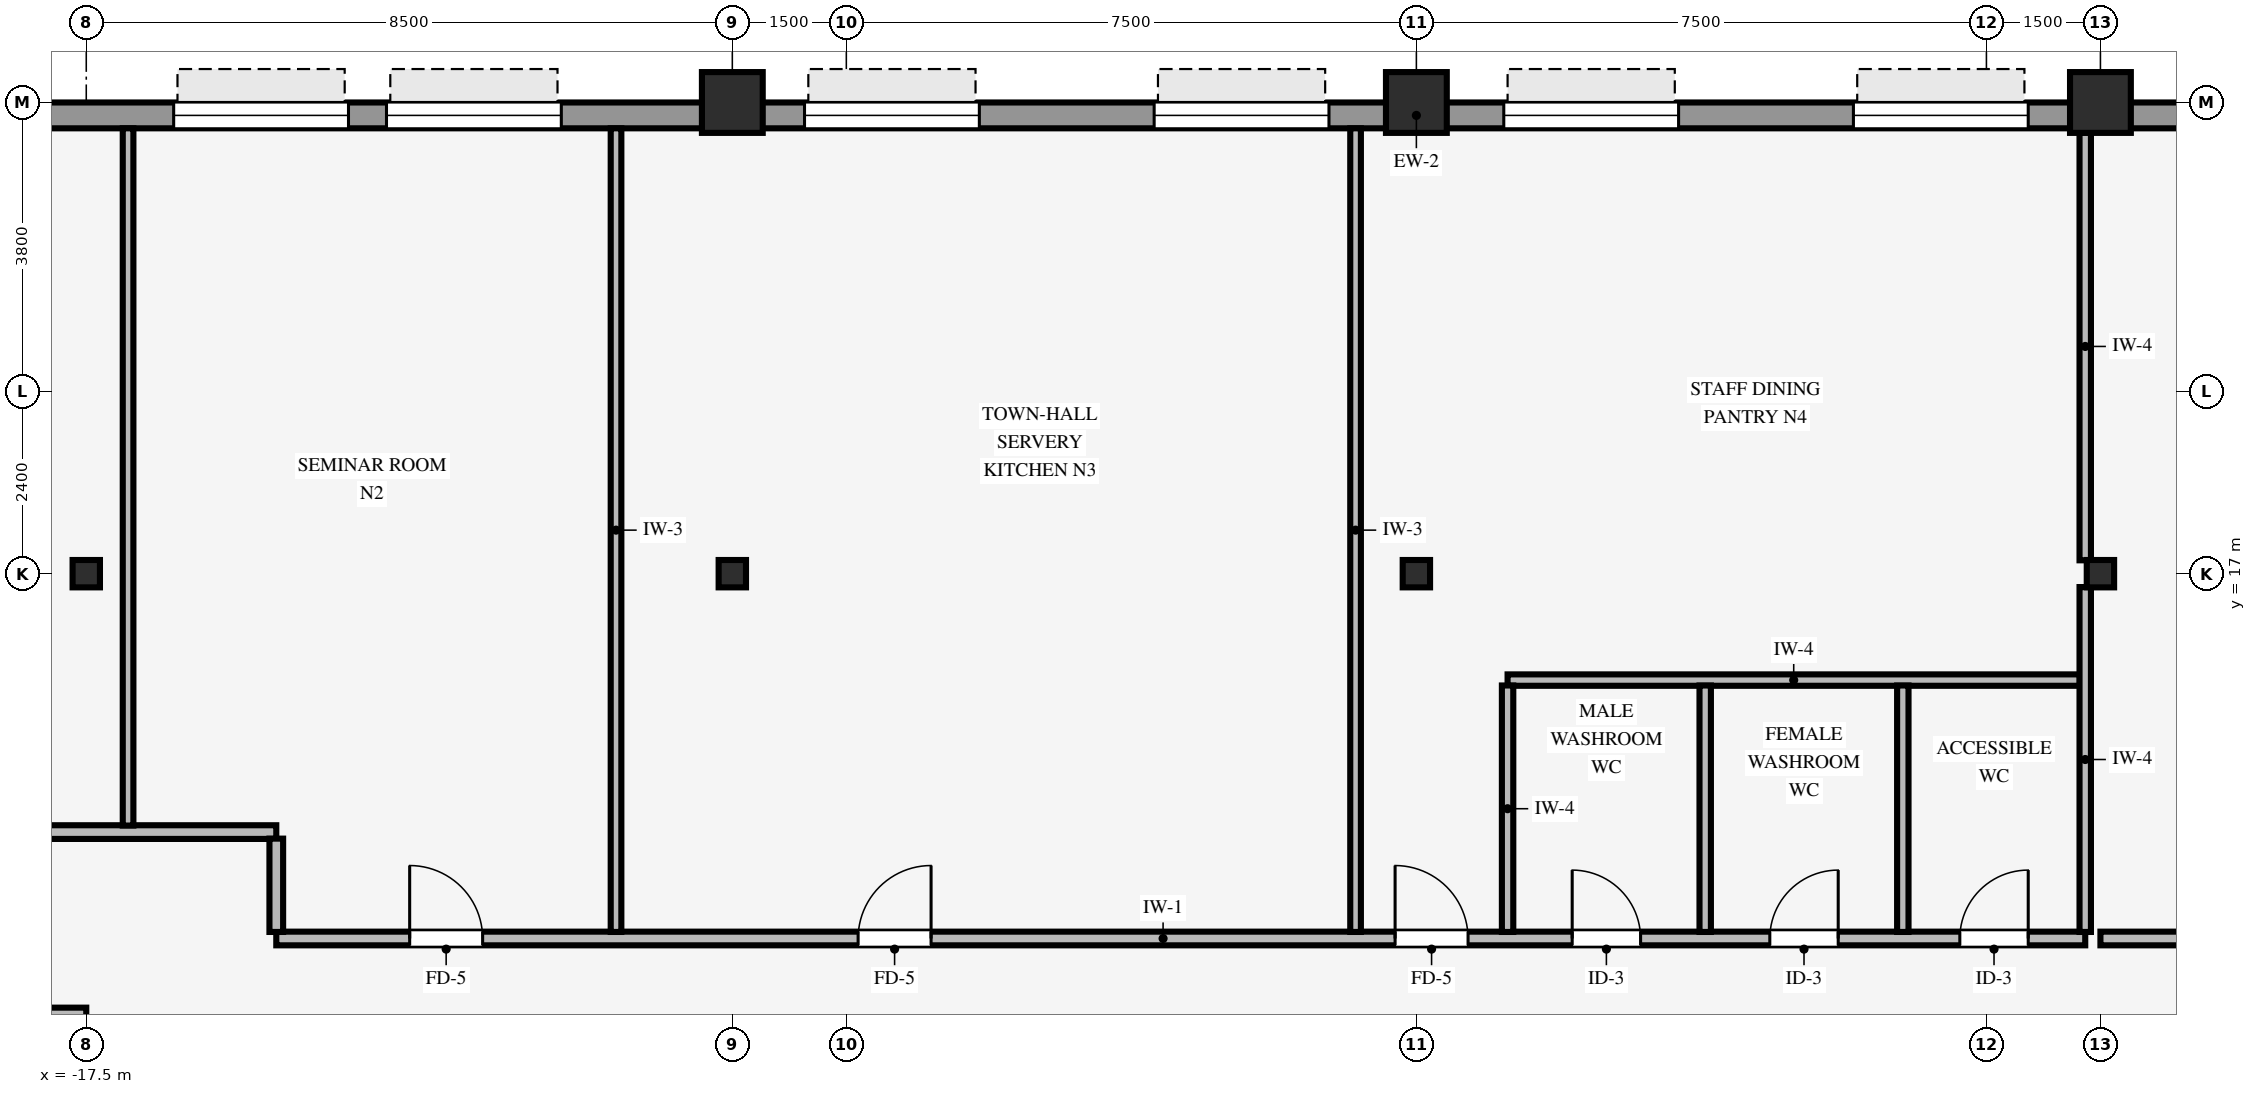
"""IFC4 building model, lengths in metres.
Left out: names, types, materials, properties, quantities, classifications, styles, units other than length and angle.
Written with IfcOpenShell. Run it as: python <this file> out.ifc"""

import sys

from ifc_helpers import new_model, si_unit, direction, frame, frame_2d, origin, origin_2d, place, context, subcontext, project, spatial, rectangle, hollow_rectangle, i_section, extrude, source, transform, mapped, element, fill, save


model = new_model("IFC4")
c1 = context("Model", 3, precision=1e-05, world=origin(), true_north=direction((0.0, 1.0)))
c2 = subcontext(c1, "Body", "Model", "MODEL_VIEW")
j1 = project(units=[si_unit("LENGTHUNIT", "METRE"), si_unit("PLANEANGLEUNIT", "RADIAN")], contexts=[c1])
p1 = place(None, origin())
s1 = spatial("IfcSite", under=j1, at=p1, CompositionType="ELEMENT")
p2 = place(p1, origin())
s2 = spatial("IfcBuilding", under=s1, at=p2, CompositionType="ELEMENT")
p3 = place(p2, frame((0.0, 0.0, 56.8)))
s3 = spatial("IfcBuildingStorey", under=s2, at=p3, CompositionType="ELEMENT", Elevation=56.8)
for number, where, z_axis, x_axis in (
    (1, (-9.0, 23.2, 0.0), (0.0, 0.0, 1.0), (1.0, 0.0, 0.0)),
    (2, (0.0, 23.2, 0.0), (0.0, 0.0, 1.0), (1.0, 0.0, 0.0)),
    (3, (9.0, 23.2, 0.0), (0.0, 0.0, 1.0), (1.0, 0.0, 0.0)),
):
    element("IfcColumn", number, at=place(p3, frame(where, z_axis=z_axis, x_axis=x_axis)), inside=s3, PredefinedType="COLUMN", context=c2, shape_type="SweptSolid", body=[
        extrude(hollow_rectangle(XDim=0.8, YDim=0.8, WallThickness=0.055, InnerFilletRadius=0.055, OuterFilletRadius=0.11, at=origin_2d()), origin(), (0.0, 0.0, 1.0), 3.37),
    ])
for number, where, z_axis, x_axis in (
    (4, (0.0, 17.0, 0.0), (0.0, 0.0, 1.0), (1.0, 0.0, 0.0)),
    (5, (-17.5, 17.0, 0.0), (0.0, 0.0, 1.0), (1.0, 0.0, 0.0)),
    (6, (-9.0, 17.0, 0.0), (0.0, 0.0, 1.0), (1.0, 0.0, 0.0)),
    (7, (9.0, 17.0, 0.0), (0.0, 0.0, 1.0), (1.0, 0.0, 0.0)),
):
    element("IfcColumn", number, at=place(p3, frame(where, z_axis=z_axis, x_axis=x_axis)), inside=s3, PredefinedType="COLUMN", context=c2, shape_type="SweptSolid", body=[
        extrude(i_section(OverallWidth=0.36, OverallDepth=0.36, WebThickness=0.021, FlangeThickness=0.021, FilletRadius=0.018, at=origin_2d()), origin(), (0.0, 0.0, 1.0), 3.37),
    ])
p4 = place(p3, frame((-19.4, 23.03, 0.0), z_axis=(0.0, 0.0, 1.0), x_axis=(1.0, 0.0, 0.0)))
e8 = element("IfcWall", 8, at=p4, inside=s3, PredefinedType="STANDARD", context=c2, shape_type="SweptSolid", body=[
    extrude(rectangle(XDim=38.8, YDim=0.34, at=frame_2d((19.4, 0.0))), origin(), (0.0, 0.0, 1.0), 2.705),
])
p5 = place(p4, frame((3.05, 0.0, 0.8)))
e9 = element("IfcOpeningElement", 9, at=p5, cuts=e8, PredefinedType="OPENING", context=c2, shape_type="SweptSolid", body=[
    extrude(rectangle(XDim=2.3, YDim=1.62, at=frame_2d((1.15, 0.81))), frame((0.0, 0.18, 0.0), z_axis=(0.0, -1.0, 0.0), x_axis=(1.0, 0.0, 0.0)), (0.0, 0.0, 1.0), 0.36),
])
p6 = place(p4, frame((5.85, 0.0, 0.8)))
e10 = element("IfcOpeningElement", 10, at=p6, cuts=e8, PredefinedType="OPENING", context=c2, shape_type="SweptSolid", body=[
    extrude(rectangle(XDim=2.3, YDim=1.62, at=frame_2d((1.15, 0.81))), frame((0.0, 0.18, 0.0), z_axis=(0.0, -1.0, 0.0), x_axis=(1.0, 0.0, 0.0)), (0.0, 0.0, 1.0), 0.36),
])
p7 = place(p4, frame((11.35, 0.0, 0.8)))
e11 = element("IfcOpeningElement", 11, at=p7, cuts=e8, PredefinedType="OPENING", context=c2, shape_type="SweptSolid", body=[
    extrude(rectangle(XDim=2.3, YDim=1.62, at=frame_2d((1.15, 0.81))), frame((0.0, 0.18, 0.0), z_axis=(0.0, -1.0, 0.0), x_axis=(1.0, 0.0, 0.0)), (0.0, 0.0, 1.0), 0.36),
])
p8 = place(p4, frame((15.95, 0.0, 0.8)))
e12 = element("IfcOpeningElement", 12, at=p8, cuts=e8, PredefinedType="OPENING", context=c2, shape_type="SweptSolid", body=[
    extrude(rectangle(XDim=2.3, YDim=1.62, at=frame_2d((1.15, 0.81))), frame((0.0, 0.18, 0.0), z_axis=(0.0, -1.0, 0.0), x_axis=(1.0, 0.0, 0.0)), (0.0, 0.0, 1.0), 0.36),
])
p9 = place(p4, frame((20.55, 0.0, 0.8)))
e13 = element("IfcOpeningElement", 13, at=p9, cuts=e8, PredefinedType="OPENING", context=c2, shape_type="SweptSolid", body=[
    extrude(rectangle(XDim=2.3, YDim=1.62, at=frame_2d((1.15, 0.81))), frame((0.0, 0.18, 0.0), z_axis=(0.0, -1.0, 0.0), x_axis=(1.0, 0.0, 0.0)), (0.0, 0.0, 1.0), 0.36),
])
p10 = place(p4, frame((25.15, 0.0, 0.8)))
e14 = element("IfcOpeningElement", 14, at=p10, cuts=e8, PredefinedType="OPENING", context=c2, shape_type="SweptSolid", body=[
    extrude(rectangle(XDim=2.3, YDim=1.62, at=frame_2d((1.15, 0.81))), frame((0.0, 0.18, 0.0), z_axis=(0.0, -1.0, 0.0), x_axis=(1.0, 0.0, 0.0)), (0.0, 0.0, 1.0), 0.36),
])
p11 = place(p4, frame((29.75, 0.0, 0.8)))
e15 = element("IfcOpeningElement", 15, at=p11, cuts=e8, PredefinedType="OPENING", context=c2, shape_type="SweptSolid", body=[
    extrude(rectangle(XDim=2.3, YDim=1.62, at=frame_2d((1.15, 0.81))), frame((0.0, 0.18, 0.0), z_axis=(0.0, -1.0, 0.0), x_axis=(1.0, 0.0, 0.0)), (0.0, 0.0, 1.0), 0.36),
])
p12 = place(p4, frame((34.35, 0.0, 0.8)))
e16 = element("IfcOpeningElement", 16, at=p12, cuts=e8, PredefinedType="OPENING", context=c2, shape_type="SweptSolid", body=[
    extrude(rectangle(XDim=2.3, YDim=1.62, at=frame_2d((1.15, 0.81))), frame((0.0, 0.18, 0.0), z_axis=(0.0, -1.0, 0.0), x_axis=(1.0, 0.0, 0.0)), (0.0, 0.0, 1.0), 0.36),
])
p13 = place(p3, frame((-21.16, 11.2, 0.0), z_axis=(0.0, 0.0, 1.0), x_axis=(1.0, 0.0, 0.0)))
e17 = element("IfcWall", 17, at=p13, inside=s3, PredefinedType="PARTITIONING", context=c2, shape_type="SweptSolid", body=[
    extrude(rectangle(XDim=3.66, YDim=0.18, at=frame_2d((1.83, 0.0))), origin(), (0.0, 0.0, 1.0), 3.36),
])
p14 = place(p13, frame((1.68, 0.0, 0.0)))
e18 = element("IfcOpeningElement", 18, at=p14, cuts=e17, PredefinedType="OPENING", context=c2, shape_type="SweptSolid", body=[
    extrude(rectangle(XDim=0.96, YDim=2.1, at=frame_2d((0.48, 1.05))), frame((0.0, 0.1, 0.0), z_axis=(0.0, -1.0, 0.0), x_axis=(1.0, 0.0, 0.0)), (0.0, 0.0, 1.0), 0.2),
])
p15 = place(p3, frame((-15.0, 12.2, 0.0), z_axis=(0.0, 0.0, 1.0), x_axis=(1.0, 0.0, 0.0)))
e19 = element("IfcWall", 19, at=p15, inside=s3, PredefinedType="PARTITIONING", context=c2, shape_type="SweptSolid", body=[
    extrude(rectangle(XDim=23.8, YDim=0.18, at=frame_2d((11.9, 0.0))), origin(), (0.0, 0.0, 1.0), 3.36),
])
p16 = place(p15, frame((7.655, 0.0, 0.0)))
e20 = element("IfcOpeningElement", 20, at=p16, cuts=e19, PredefinedType="OPENING", context=c2, shape_type="SweptSolid", body=[
    extrude(rectangle(XDim=0.96, YDim=2.1, at=frame_2d((0.48, 1.05))), frame((0.0, 0.1, 0.0), z_axis=(0.0, -1.0, 0.0), x_axis=(1.0, 0.0, 0.0)), (0.0, 0.0, 1.0), 0.2),
])
p17 = place(p15, frame((1.755, 0.0, 0.0)))
e21 = element("IfcOpeningElement", 21, at=p17, cuts=e19, PredefinedType="OPENING", context=c2, shape_type="SweptSolid", body=[
    extrude(rectangle(XDim=0.96, YDim=2.1, at=frame_2d((0.48, 1.05))), frame((0.0, 0.1, 0.0), z_axis=(0.0, -1.0, 0.0), x_axis=(1.0, 0.0, 0.0)), (0.0, 0.0, 1.0), 0.2),
])
p18 = place(p15, frame((19.65, 0.0, 0.0)))
e22 = element("IfcOpeningElement", 22, at=p18, cuts=e19, PredefinedType="OPENING", context=c2, shape_type="SweptSolid", body=[
    extrude(rectangle(XDim=0.9, YDim=2.1, at=frame_2d((0.45, 1.05))), frame((0.0, 0.1, 0.0), z_axis=(0.0, -1.0, 0.0), x_axis=(1.0, 0.0, 0.0)), (0.0, 0.0, 1.0), 0.2),
])
p19 = place(p15, frame((17.05, 0.0, 0.0)))
e23 = element("IfcOpeningElement", 23, at=p19, cuts=e19, PredefinedType="OPENING", context=c2, shape_type="SweptSolid", body=[
    extrude(rectangle(XDim=0.9, YDim=2.1, at=frame_2d((0.45, 1.05))), frame((0.0, 0.1, 0.0), z_axis=(0.0, -1.0, 0.0), x_axis=(1.0, 0.0, 0.0)), (0.0, 0.0, 1.0), 0.2),
])
p20 = place(p15, frame((22.15, 0.0, 0.0)))
e24 = element("IfcOpeningElement", 24, at=p20, cuts=e19, PredefinedType="OPENING", context=c2, shape_type="SweptSolid", body=[
    extrude(rectangle(XDim=0.9, YDim=2.1, at=frame_2d((0.45, 1.05))), frame((0.0, 0.1, 0.0), z_axis=(0.0, -1.0, 0.0), x_axis=(1.0, 0.0, 0.0)), (0.0, 0.0, 1.0), 0.2),
])
p21 = place(p15, frame((14.72, 0.0, 0.0)))
e25 = element("IfcOpeningElement", 25, at=p21, cuts=e19, PredefinedType="OPENING", context=c2, shape_type="SweptSolid", body=[
    extrude(rectangle(XDim=0.96, YDim=2.1, at=frame_2d((0.48, 1.05))), frame((0.0, 0.1, 0.0), z_axis=(0.0, -1.0, 0.0), x_axis=(1.0, 0.0, 0.0)), (0.0, 0.0, 1.0), 0.2),
])
p22 = place(p3, frame((9.0, 12.2, 0.0), z_axis=(0.0, 0.0, 1.0), x_axis=(1.0, 0.0, 0.0)))
e26 = element("IfcWall", 26, at=p22, inside=s3, PredefinedType="PARTITIONING", context=c2, shape_type="SweptSolid", body=[
    extrude(rectangle(XDim=6.0, YDim=0.18, at=frame_2d((3.0, 0.0))), origin(), (0.0, 0.0, 1.0), 3.36),
])
p23 = place(p22, frame((2.52, 0.0, 0.0)))
e27 = element("IfcOpeningElement", 27, at=p23, cuts=e26, PredefinedType="OPENING", context=c2, shape_type="SweptSolid", body=[
    extrude(rectangle(XDim=0.96, YDim=2.1, at=frame_2d((0.48, 1.05))), frame((0.0, 0.1, 0.0), z_axis=(0.0, -1.0, 0.0), x_axis=(1.0, 0.0, 0.0)), (0.0, 0.0, 1.0), 0.2),
])
p24 = place(p3, frame((-20.5, 13.6, 0.0), z_axis=(0.0, 0.0, 1.0), x_axis=(1.0, 0.0, 0.0)))
e28 = element("IfcWall", 28, at=p24, inside=s3, PredefinedType="PARTITIONING", context=c2, shape_type="SweptSolid", body=[
    extrude(rectangle(XDim=5.5, YDim=0.18, at=frame_2d((2.75, 0.0))), origin(), (0.0, 0.0, 1.0), 2.942),
])
p25 = place(p24, frame((1.295, 0.0, 0.0)))
e29 = element("IfcOpeningElement", 29, at=p25, cuts=e28, PredefinedType="OPENING", context=c2, shape_type="SweptSolid", body=[
    extrude(rectangle(XDim=0.96, YDim=2.1, at=frame_2d((0.48, 1.05))), frame((0.0, 0.1, 0.0), z_axis=(0.0, -1.0, 0.0), x_axis=(1.0, 0.0, 0.0)), (0.0, 0.0, 1.0), 0.2),
])
p26 = place(p3, frame((1.2, 15.6, 0.0), z_axis=(0.0, 0.0, 1.0), x_axis=(1.0, 0.0, 0.0)))
e30 = element("IfcWall", 30, at=p26, inside=s3, PredefinedType="PARTITIONING", context=c2, shape_type="SweptSolid", body=[
    extrude(rectangle(XDim=7.529, YDim=0.15, at=frame_2d((3.765, 0.0))), origin(), (0.0, 0.0, 1.0), 3.36),
])
p27 = place(p3, frame((-16.95, 13.686, 0.0), z_axis=(0.0, 0.0, 1.0), x_axis=(0.0, 1.0, 0.0)))
e31 = element("IfcWall", 31, at=p27, inside=s3, PredefinedType="PARTITIONING", context=c2, shape_type="SweptSolid", body=[
    extrude(rectangle(XDim=9.174, YDim=0.14, at=frame_2d((4.587, 0.0))), origin(), (0.0, 0.0, 1.0), 3.36),
])
p28 = place(p3, frame((-15.0, 12.286, 0.0), z_axis=(0.0, 0.0, 1.0), x_axis=(0.0, 1.0, 0.0)))
e32 = element("IfcWall", 32, at=p28, inside=s3, PredefinedType="PARTITIONING", context=c2, shape_type="SweptSolid", body=[
    extrude(rectangle(XDim=1.228, YDim=0.18, at=frame_2d((0.614, 0.0))), origin(), (0.0, 0.0, 1.0), 3.36),
])
for number, where, z_axis, x_axis in (
    (33, (-10.53, 12.286, 0.0), (0.0, 0.0, 1.0), (0.0, 1.0, 0.0)),
    (34, (-0.8, 12.286, 0.0), (0.0, 0.0, 1.0), (0.0, 1.0, 0.0)),
):
    element("IfcWall", number, at=place(p3, frame(where, z_axis=z_axis, x_axis=x_axis)), inside=s3, PredefinedType="PARTITIONING", context=c2, shape_type="SweptSolid", body=[
        extrude(rectangle(XDim=10.574, YDim=0.14, at=frame_2d((5.287, 0.0))), origin(), (0.0, 0.0, 1.0), 3.36),
    ])
for number, where, z_axis, x_axis in (
    (35, (1.2, 12.286, 0.0), (0.0, 0.0, 1.0), (0.0, 1.0, 0.0)),
    (36, (3.8, 12.286, 0.0), (0.0, 0.0, 1.0), (0.0, 1.0, 0.0)),
    (37, (6.4, 12.286, 0.0), (0.0, 0.0, 1.0), (0.0, 1.0, 0.0)),
):
    element("IfcWall", number, at=place(p3, frame(where, z_axis=z_axis, x_axis=x_axis)), inside=s3, PredefinedType="PARTITIONING", context=c2, shape_type="SweptSolid", body=[
        extrude(rectangle(XDim=3.243, YDim=0.15, at=frame_2d((1.622, 0.0))), origin(), (0.0, 0.0, 1.0), 3.36),
    ])
p29 = place(p3, frame((8.8, 12.286, 0.0), z_axis=(0.0, 0.0, 1.0), x_axis=(0.0, 1.0, 0.0)))
e38 = element("IfcWall", 38, at=p29, inside=s3, PredefinedType="PARTITIONING", context=c2, shape_type="SweptSolid", body=[
    extrude(rectangle(XDim=4.538, YDim=0.15, at=frame_2d((2.269, 0.0))), origin(), (0.0, 0.0, 1.0), 2.738),
])
p30 = place(p3, frame((8.8, 17.176, 0.0), z_axis=(0.0, 0.0, 1.0), x_axis=(0.0, 1.0, 0.0)))
e39 = element("IfcWall", 39, at=p30, inside=s3, PredefinedType="PARTITIONING", context=c2, shape_type="SweptSolid", body=[
    extrude(rectangle(XDim=5.628, YDim=0.15, at=frame_2d((2.814, 0.0))), origin(), (0.0, 0.0, 1.0), 2.738),
])
m1 = source(origin(), c2, "Body", "SweptSolid", [
    extrude(rectangle(XDim=2.3, YDim=1.62, at=frame_2d((1.15, 0.81))), frame((0.0, 0.03, 0.0), z_axis=(0.0, -1.0, 0.0), x_axis=(1.0, 0.0, 0.0)), (0.0, 0.0, 1.0), 0.06),
])
p31 = place(p5, origin())
e40 = element("IfcWindow", 40, at=p31, inside=s3, PartitioningType="SINGLE_PANEL", PredefinedType="WINDOW", context=c2, shape_type="MappedRepresentation", body=[
    mapped(m1, transform((0.0, 0.0, 0.0), scale=1.0)),
])
fill(e9, e40)
p32 = place(p6, origin())
e41 = element("IfcWindow", 41, at=p32, inside=s3, PartitioningType="SINGLE_PANEL", PredefinedType="WINDOW", context=c2, shape_type="MappedRepresentation", body=[
    mapped(m1, transform((0.0, 0.0, 0.0), scale=1.0)),
])
fill(e10, e41)
p33 = place(p7, origin())
e42 = element("IfcWindow", 42, at=p33, inside=s3, PartitioningType="SINGLE_PANEL", PredefinedType="WINDOW", context=c2, shape_type="MappedRepresentation", body=[
    mapped(m1, transform((0.0, 0.0, 0.0), scale=1.0)),
])
fill(e11, e42)
p34 = place(p8, origin())
e43 = element("IfcWindow", 43, at=p34, inside=s3, PartitioningType="SINGLE_PANEL", PredefinedType="WINDOW", context=c2, shape_type="MappedRepresentation", body=[
    mapped(m1, transform((0.0, 0.0, 0.0), scale=1.0)),
])
fill(e12, e43)
p35 = place(p9, origin())
e44 = element("IfcWindow", 44, at=p35, inside=s3, PartitioningType="SINGLE_PANEL", PredefinedType="WINDOW", context=c2, shape_type="MappedRepresentation", body=[
    mapped(m1, transform((0.0, 0.0, 0.0), scale=1.0)),
])
fill(e13, e44)
p36 = place(p10, origin())
e45 = element("IfcWindow", 45, at=p36, inside=s3, PartitioningType="SINGLE_PANEL", PredefinedType="WINDOW", context=c2, shape_type="MappedRepresentation", body=[
    mapped(m1, transform((0.0, 0.0, 0.0), scale=1.0)),
])
fill(e14, e45)
m2 = source(origin(), c2, "Body", "SweptSolid", [
    extrude(rectangle(XDim=0.96, YDim=2.1, at=frame_2d((0.48, 1.05))), frame((0.0, 0.025, 0.0), z_axis=(0.0, -1.0, 0.0), x_axis=(1.0, 0.0, 0.0)), (0.0, 0.0, 1.0), 0.05),
])
p37 = place(p16, origin())
e46 = element("IfcDoor", 46, at=p37, inside=s3, OperationType="SINGLE_SWING_RIGHT", PredefinedType="DOOR", context=c2, shape_type="MappedRepresentation", body=[
    mapped(m2, transform((0.0, 0.0, 0.0), scale=1.0)),
])
fill(e20, e46)
p38 = place(p17, origin())
e47 = element("IfcDoor", 47, at=p38, inside=s3, OperationType="SINGLE_SWING_LEFT", PredefinedType="DOOR", context=c2, shape_type="MappedRepresentation", body=[
    mapped(m2, transform((0.0, 0.0, 0.0), scale=1.0)),
])
fill(e21, e47)
m3 = source(origin(), c2, "Body", "SweptSolid", [
    extrude(rectangle(XDim=0.9, YDim=2.1, at=frame_2d((0.45, 1.05))), frame((0.0, 0.025, 0.0), z_axis=(0.0, -1.0, 0.0), x_axis=(1.0, 0.0, 0.0)), (0.0, 0.0, 1.0), 0.05),
])
p39 = place(p18, origin())
e48 = element("IfcDoor", 48, at=p39, inside=s3, OperationType="SINGLE_SWING_RIGHT", PredefinedType="DOOR", context=c2, shape_type="MappedRepresentation", body=[
    mapped(m3, transform((0.0, 0.0, 0.0), scale=1.0)),
])
fill(e22, e48)
p40 = place(p19, origin())
e49 = element("IfcDoor", 49, at=p40, inside=s3, OperationType="SINGLE_SWING_LEFT", PredefinedType="DOOR", context=c2, shape_type="MappedRepresentation", body=[
    mapped(m3, transform((0.0, 0.0, 0.0), scale=1.0)),
])
fill(e23, e49)
p41 = place(p20, origin())
e50 = element("IfcDoor", 50, at=p41, inside=s3, OperationType="SINGLE_SWING_RIGHT", PredefinedType="DOOR", context=c2, shape_type="MappedRepresentation", body=[
    mapped(m3, transform((0.0, 0.0, 0.0), scale=1.0)),
])
fill(e24, e50)
p42 = place(p21, origin())
e51 = element("IfcDoor", 51, at=p42, inside=s3, OperationType="SINGLE_SWING_LEFT", PredefinedType="DOOR", context=c2, shape_type="MappedRepresentation", body=[
    mapped(m2, transform((0.0, 0.0, 0.0), scale=1.0)),
])
fill(e25, e51)
save(model, sys.argv[1])
